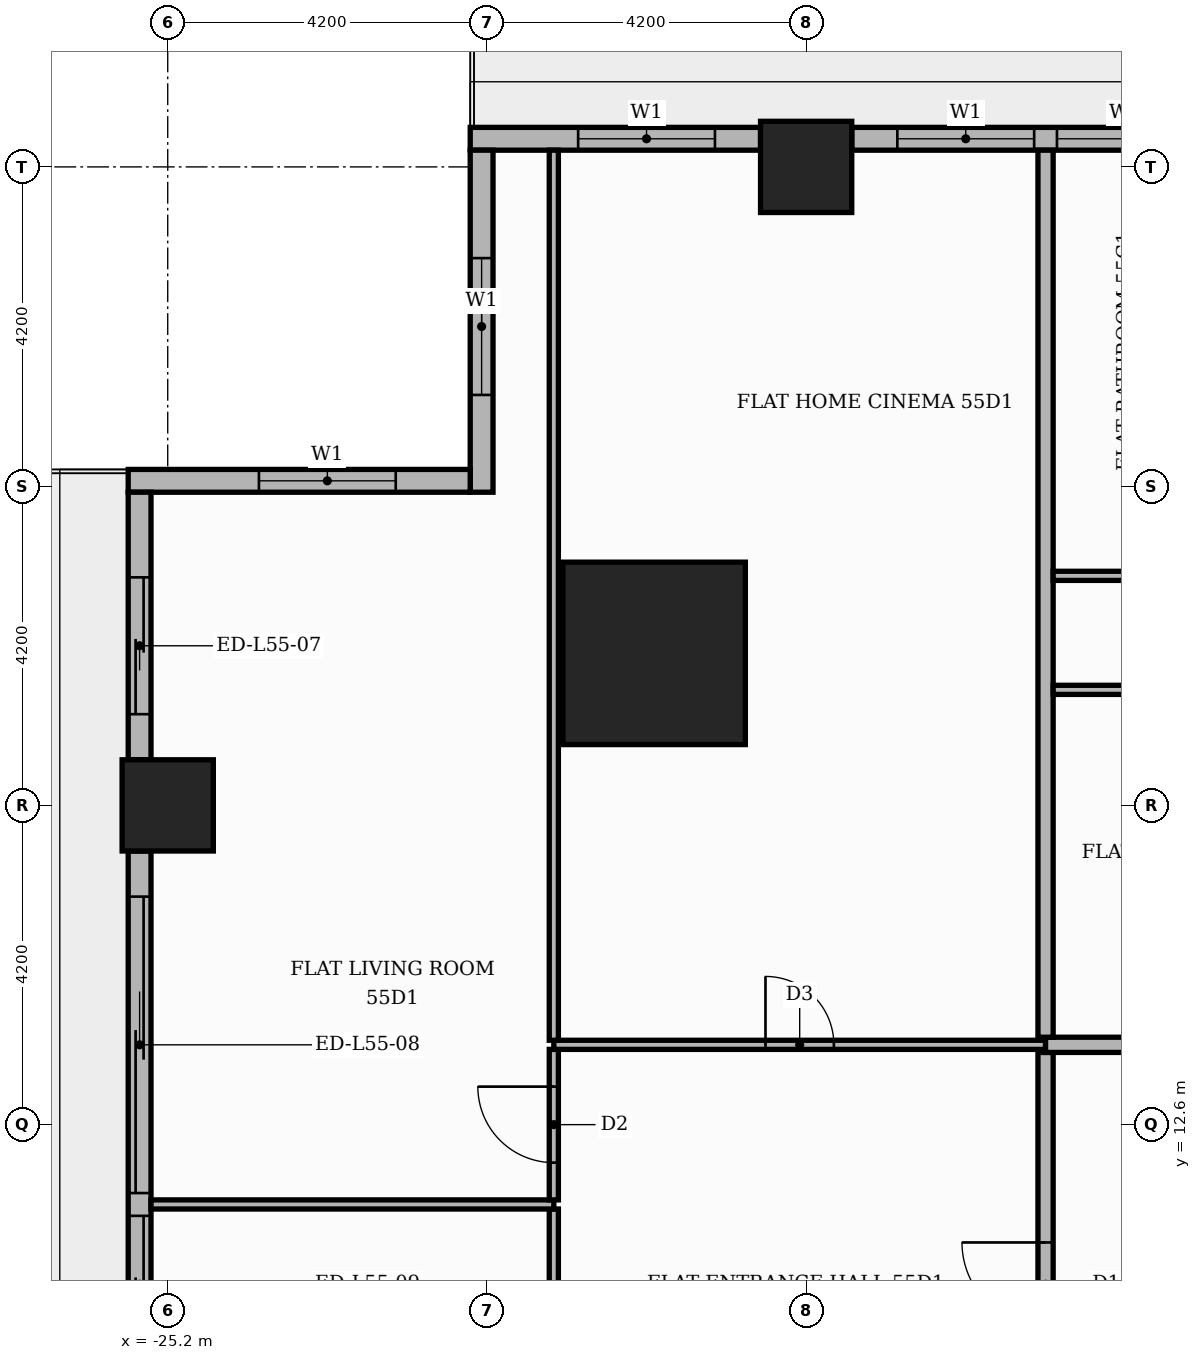
"""IFC4 building model, lengths in metres.
Left out: names, types, materials, properties, quantities, classifications, styles, units other than length and angle.
Written with IfcOpenShell. Run it as: python <this file> out.ifc"""

import sys

from ifc_helpers import new_model, si_unit, direction, frame, frame_2d, origin, origin_2d, place, context, subcontext, project, spatial, rectangle, extrude, element, fill, save


model = new_model("IFC4")
c1 = context("Model", 3, precision=1e-05, world=origin(), true_north=direction((0.0, 1.0)))
c2 = subcontext(c1, "Body", "Model", "MODEL_VIEW")
j1 = project(units=[si_unit("LENGTHUNIT", "METRE"), si_unit("PLANEANGLEUNIT", "RADIAN")], contexts=[c1])
p1 = place(None, origin())
s1 = spatial("IfcSite", under=j1, at=p1, CompositionType="ELEMENT")
p2 = place(p1, origin())
s2 = spatial("IfcBuilding", under=s1, at=p2, CompositionType="ELEMENT")
p3 = place(p2, frame((0.0, 0.0, 231.3)))
s3 = spatial("IfcBuildingStorey", under=s2, at=p3, CompositionType="ELEMENT", Elevation=231.3)
p4 = place(p3, frame((-18.8, 18.8, 0.0), z_axis=(0.0, 0.0, 1.0), x_axis=(1.0, 0.0, 0.0)))
e1 = element("IfcColumn", 1, at=p4, inside=s3, PredefinedType="COLUMN", context=c2, shape_type="SweptSolid", body=[
    extrude(rectangle(XDim=2.4, YDim=2.4, at=origin_2d()), origin(), (0.0, 0.0, 1.0), 3.9),
])
for number, where, z_axis, x_axis in (
    (2, (-16.8, 25.2, 0.0), (0.0, 0.0, 1.0), (1.0, 0.0, 0.0)),
    (3, (-25.2, 16.8, 0.0), (0.0, 0.0, 1.0), (1.0, 0.0, 0.0)),
):
    element("IfcColumn", number, at=place(p3, frame(where, z_axis=z_axis, x_axis=x_axis)), inside=s3, PredefinedType="COLUMN", context=c2, shape_type="SweptSolid", body=[
        extrude(rectangle(XDim=1.2, YDim=1.2, at=origin_2d()), origin(), (0.0, 0.0, 1.0), 3.9),
    ])
p5 = place(p3, frame((-9.0, 25.57, 0.0), z_axis=(0.0, 0.0, 1.0), x_axis=(-1.0, 0.0, 0.0)))
e4 = element("IfcWall", 4, at=p5, inside=s3, PredefinedType="STANDARD", context=c2, shape_type="SweptSolid", body=[
    extrude(rectangle(XDim=7.2, YDim=0.3, at=frame_2d((3.6, 0.0))), origin(), (0.0, 0.0, 1.0), 3.4),
])
p6 = place(p5, frame((0.6, 0.0, 0.9)))
e5 = element("IfcOpeningElement", 5, at=p6, cuts=e4, PredefinedType="OPENING", context=c2, shape_type="SweptSolid", body=[
    extrude(rectangle(XDim=1.8, YDim=2.1, at=frame_2d((0.9, 1.05))), frame((0.0, 0.16, 0.0), z_axis=(0.0, -1.0, 0.0), x_axis=(1.0, 0.0, 0.0)), (0.0, 0.0, 1.0), 0.32),
])
p7 = place(p5, frame((2.7, 0.0, 0.9)))
e6 = element("IfcOpeningElement", 6, at=p7, cuts=e4, PredefinedType="OPENING", context=c2, shape_type="SweptSolid", body=[
    extrude(rectangle(XDim=1.8, YDim=2.1, at=frame_2d((0.9, 1.05))), frame((0.0, 0.16, 0.0), z_axis=(0.0, -1.0, 0.0), x_axis=(1.0, 0.0, 0.0)), (0.0, 0.0, 1.0), 0.32),
])
p8 = place(p5, frame((4.8, 0.0, 0.9)))
e7 = element("IfcOpeningElement", 7, at=p8, cuts=e4, PredefinedType="OPENING", context=c2, shape_type="SweptSolid", body=[
    extrude(rectangle(XDim=1.8, YDim=2.1, at=frame_2d((0.9, 1.05))), frame((0.0, 0.16, 0.0), z_axis=(0.0, -1.0, 0.0), x_axis=(1.0, 0.0, 0.0)), (0.0, 0.0, 1.0), 0.32),
])
p9 = place(p3, frame((-17.4, 25.57, 0.0), z_axis=(0.0, 0.0, 1.0), x_axis=(-1.0, 0.0, 0.0)))
e8 = element("IfcWall", 8, at=p9, inside=s3, PredefinedType="STANDARD", context=c2, shape_type="SweptSolid", body=[
    extrude(rectangle(XDim=3.82, YDim=0.3, at=frame_2d((1.91, 0.0))), origin(), (0.0, 0.0, 1.0), 3.4),
])
p10 = place(p9, frame((0.6, 0.0, 0.9)))
e9 = element("IfcOpeningElement", 9, at=p10, cuts=e8, PredefinedType="OPENING", context=c2, shape_type="SweptSolid", body=[
    extrude(rectangle(XDim=1.8, YDim=2.1, at=frame_2d((0.9, 1.05))), frame((0.0, 0.16, 0.0), z_axis=(0.0, -1.0, 0.0), x_axis=(1.0, 0.0, 0.0)), (0.0, 0.0, 1.0), 0.32),
])
p11 = place(p3, frame((-21.07, 25.42, 0.0), z_axis=(0.0, 0.0, 1.0), x_axis=(0.0, -1.0, 0.0)))
e10 = element("IfcWall", 10, at=p11, inside=s3, PredefinedType="STANDARD", context=c2, shape_type="SweptSolid", body=[
    extrude(rectangle(XDim=4.5, YDim=0.3, at=frame_2d((2.25, 0.0))), origin(), (0.0, 0.0, 1.0), 3.4),
])
p12 = place(p11, frame((1.42, 0.0, 0.9)))
e11 = element("IfcOpeningElement", 11, at=p12, cuts=e10, PredefinedType="OPENING", context=c2, shape_type="SweptSolid", body=[
    extrude(rectangle(XDim=1.8, YDim=2.1, at=frame_2d((0.9, 1.05))), frame((0.0, 0.16, 0.0), z_axis=(0.0, -1.0, 0.0), x_axis=(1.0, 0.0, 0.0)), (0.0, 0.0, 1.0), 0.32),
])
p13 = place(p3, frame((-21.22, 21.07, 0.0), z_axis=(0.0, 0.0, 1.0), x_axis=(-1.0, 0.0, 0.0)))
e12 = element("IfcWall", 12, at=p13, inside=s3, PredefinedType="STANDARD", context=c2, shape_type="SweptSolid", body=[
    extrude(rectangle(XDim=4.5, YDim=0.3, at=frame_2d((2.25, 0.0))), origin(), (0.0, 0.0, 1.0), 3.4),
])
p14 = place(p13, frame((0.98, 0.0, 0.9)))
e13 = element("IfcOpeningElement", 13, at=p14, cuts=e12, PredefinedType="OPENING", context=c2, shape_type="SweptSolid", body=[
    extrude(rectangle(XDim=1.8, YDim=2.1, at=frame_2d((0.9, 1.05))), frame((0.0, 0.16, 0.0), z_axis=(0.0, -1.0, 0.0), x_axis=(1.0, 0.0, 0.0)), (0.0, 0.0, 1.0), 0.32),
])
p15 = place(p3, frame((-25.57, 20.92, 0.0), z_axis=(0.0, 0.0, 1.0), x_axis=(0.0, -1.0, 0.0)))
e14 = element("IfcWall", 14, at=p15, inside=s3, PredefinedType="STANDARD", context=c2, shape_type="SweptSolid", body=[
    extrude(rectangle(XDim=3.52, YDim=0.3, at=frame_2d((1.76, 0.0))), origin(), (0.0, 0.0, 1.0), 3.4),
])
p16 = place(p15, frame((1.12, 0.0, 0.0)))
e15 = element("IfcOpeningElement", 15, at=p16, cuts=e14, PredefinedType="OPENING", context=c2, shape_type="SweptSolid", body=[
    extrude(rectangle(XDim=1.8, YDim=2.4, at=frame_2d((0.9, 1.2))), frame((0.0, 0.16, 0.0), z_axis=(0.0, -1.0, 0.0), x_axis=(1.0, 0.0, 0.0)), (0.0, 0.0, 1.0), 0.32),
])
p17 = place(p3, frame((-25.57, 16.2, 0.0), z_axis=(0.0, 0.0, 1.0), x_axis=(0.0, -1.0, 0.0)))
e16 = element("IfcWall", 16, at=p17, inside=s3, PredefinedType="STANDARD", context=c2, shape_type="SweptSolid", body=[
    extrude(rectangle(XDim=7.2, YDim=0.3, at=frame_2d((3.6, 0.0))), origin(), (0.0, 0.0, 1.0), 3.4),
])
p18 = place(p17, frame((0.6, 0.0, 0.0)))
e17 = element("IfcOpeningElement", 17, at=p18, cuts=e16, PredefinedType="OPENING", context=c2, shape_type="SweptSolid", body=[
    extrude(rectangle(XDim=3.9, YDim=2.4, at=frame_2d((1.95, 1.2))), frame((0.0, 0.16, 0.0), z_axis=(0.0, -1.0, 0.0), x_axis=(1.0, 0.0, 0.0)), (0.0, 0.0, 1.0), 0.32),
])
p19 = place(p17, frame((4.8, 0.0, 0.0)))
e18 = element("IfcOpeningElement", 18, at=p19, cuts=e16, PredefinedType="OPENING", context=c2, shape_type="SweptSolid", body=[
    extrude(rectangle(XDim=1.8, YDim=2.4, at=frame_2d((0.9, 1.2))), frame((0.0, 0.16, 0.0), z_axis=(0.0, -1.0, 0.0), x_axis=(1.0, 0.0, 0.0)), (0.0, 0.0, 1.0), 0.32),
])
p20 = place(p3, frame((-13.65, -13.55, 0.0), z_axis=(0.0, 0.0, 1.0), x_axis=(0.0, 1.0, 0.0)))
e19 = element("IfcWall", 19, at=p20, inside=s3, PredefinedType="PARTITIONING", context=c2, shape_type="SweptSolid", body=[
    extrude(rectangle(XDim=27.1, YDim=0.2, at=frame_2d((13.55, 0.0))), origin(), (0.0, 0.0, 1.0), 3.4),
])
p21 = place(p20, frame((23.5, 0.0, 0.0)))
e20 = element("IfcOpeningElement", 20, at=p21, cuts=e19, PredefinedType="OPENING", context=c2, shape_type="SweptSolid", body=[
    extrude(rectangle(XDim=1.1, YDim=2.4, at=frame_2d((0.55, 1.2))), frame((0.0, 0.11, 0.0), z_axis=(0.0, -1.0, 0.0), x_axis=(1.0, 0.0, 0.0)), (0.0, 0.0, 1.0), 0.22),
])
p22 = place(p3, frame((-20.12, 3.21, 0.0), z_axis=(0.0, 0.0, 1.0), x_axis=(0.0, 1.0, 0.0)))
e21 = element("IfcWall", 21, at=p22, inside=s3, PredefinedType="PARTITIONING", context=c2, shape_type="SweptSolid", body=[
    extrude(rectangle(XDim=8.28, YDim=0.12, at=frame_2d((4.14, 0.0))), origin(), (0.0, 0.0, 1.0), 3.4),
])
p23 = place(p22, frame((3.69, 0.0, 0.0)))
e22 = element("IfcOpeningElement", 22, at=p23, cuts=e21, PredefinedType="OPENING", context=c2, shape_type="SweptSolid", body=[
    extrude(rectangle(XDim=0.9, YDim=2.1, at=frame_2d((0.45, 1.05))), frame((0.0, 0.07, 0.0), z_axis=(0.0, -1.0, 0.0), x_axis=(1.0, 0.0, 0.0)), (0.0, 0.0, 1.0), 0.14),
])
p24 = place(p3, frame((-25.42, 11.55, 0.0), z_axis=(0.0, 0.0, 1.0), x_axis=(1.0, 0.0, 0.0)))
e23 = element("IfcWall", 23, at=p24, inside=s3, PredefinedType="PARTITIONING", context=c2, shape_type="SweptSolid", body=[
    extrude(rectangle(XDim=5.3, YDim=0.12, at=frame_2d((2.65, 0.0))), origin(), (0.0, 0.0, 1.0), 3.4),
])
p25 = place(p3, frame((-20.12, 11.61, 0.0), z_axis=(0.0, 0.0, 1.0), x_axis=(0.0, 1.0, 0.0)))
e24 = element("IfcWall", 24, at=p25, inside=s3, PredefinedType="PARTITIONING", context=c2, shape_type="SweptSolid", body=[
    extrude(rectangle(XDim=1.98, YDim=0.12, at=frame_2d((0.99, 0.0))), origin(), (0.0, 0.0, 1.0), 3.4),
])
p26 = place(p25, frame((0.49, 0.0, 0.0)))
e25 = element("IfcOpeningElement", 25, at=p26, cuts=e24, PredefinedType="OPENING", context=c2, shape_type="SweptSolid", body=[
    extrude(rectangle(XDim=1.0, YDim=2.1, at=frame_2d((0.5, 1.05))), frame((0.0, 0.07, 0.0), z_axis=(0.0, -1.0, 0.0), x_axis=(1.0, 0.0, 0.0)), (0.0, 0.0, 1.0), 0.14),
])
p27 = place(p3, frame((-20.12, 13.65, 0.0), z_axis=(0.0, 0.0, 1.0), x_axis=(1.0, 0.0, 0.0)))
e26 = element("IfcWall", 26, at=p27, inside=s3, PredefinedType="PARTITIONING", context=c2, shape_type="SweptSolid", body=[
    extrude(rectangle(XDim=6.47, YDim=0.12, at=frame_2d((3.235, 0.0))), origin(), (0.0, 0.0, 1.0), 3.4),
])
p28 = place(p27, frame((2.785, 0.0, 0.0)))
e27 = element("IfcOpeningElement", 27, at=p28, cuts=e26, PredefinedType="OPENING", context=c2, shape_type="SweptSolid", body=[
    extrude(rectangle(XDim=0.9, YDim=2.1, at=frame_2d((0.45, 1.05))), frame((0.0, 0.07, 0.0), z_axis=(0.0, -1.0, 0.0), x_axis=(1.0, 0.0, 0.0)), (0.0, 0.0, 1.0), 0.14),
])
p29 = place(p3, frame((-13.65, 13.65, 0.0), z_axis=(0.0, 0.0, 1.0), x_axis=(1.0, 0.0, 0.0)))
e28 = element("IfcWall", 28, at=p29, inside=s3, PredefinedType="PARTITIONING", context=c2, shape_type="SweptSolid", body=[
    extrude(rectangle(XDim=34.07, YDim=0.2, at=frame_2d((17.035, 0.0))), origin(), (0.0, 0.0, 1.0), 3.4),
])
p30 = place(p29, frame((23.6, 0.0, 0.0)))
e29 = element("IfcOpeningElement", 29, at=p30, cuts=e28, PredefinedType="OPENING", context=c2, shape_type="SweptSolid", body=[
    extrude(rectangle(XDim=1.1, YDim=2.4, at=frame_2d((0.55, 1.2))), frame((0.0, 0.11, 0.0), z_axis=(0.0, -1.0, 0.0), x_axis=(1.0, 0.0, 0.0)), (0.0, 0.0, 1.0), 0.22),
])
p31 = place(p3, frame((-20.12, 13.71, 0.0), z_axis=(0.0, 0.0, 1.0), x_axis=(0.0, 1.0, 0.0)))
e30 = element("IfcWall", 30, at=p31, inside=s3, PredefinedType="PARTITIONING", context=c2, shape_type="SweptSolid", body=[
    extrude(rectangle(XDim=11.71, YDim=0.12, at=frame_2d((5.855, 0.0))), origin(), (0.0, 0.0, 1.0), 3.4),
])
p32 = place(p3, frame((-13.65, 13.75, 0.0), z_axis=(0.0, 0.0, 1.0), x_axis=(0.0, 1.0, 0.0)))
e31 = element("IfcWall", 31, at=p32, inside=s3, PredefinedType="PARTITIONING", context=c2, shape_type="SweptSolid", body=[
    extrude(rectangle(XDim=11.67, YDim=0.2, at=frame_2d((5.835, 0.0))), origin(), (0.0, 0.0, 1.0), 3.4),
])
p33 = place(p3, frame((-13.55, 18.32, 0.0), z_axis=(0.0, 0.0, 1.0), x_axis=(1.0, 0.0, 0.0)))
e32 = element("IfcWall", 32, at=p33, inside=s3, PredefinedType="PARTITIONING", context=c2, shape_type="SweptSolid", body=[
    extrude(rectangle(XDim=20.9, YDim=0.12, at=frame_2d((10.45, 0.0))), origin(), (0.0, 0.0, 1.0), 3.4),
])
p34 = place(p33, frame((17.525, 0.0, 0.0)))
e33 = element("IfcOpeningElement", 33, at=p34, cuts=e32, PredefinedType="OPENING", context=c2, shape_type="SweptSolid", body=[
    extrude(rectangle(XDim=0.9, YDim=2.1, at=frame_2d((0.45, 1.05))), frame((0.0, 0.07, 0.0), z_axis=(0.0, -1.0, 0.0), x_axis=(1.0, 0.0, 0.0)), (0.0, 0.0, 1.0), 0.14),
])
p35 = place(p33, frame((12.35, 0.0, 0.0)))
e34 = element("IfcOpeningElement", 34, at=p35, cuts=e32, PredefinedType="OPENING", context=c2, shape_type="SweptSolid", body=[
    extrude(rectangle(XDim=0.9, YDim=2.1, at=frame_2d((0.45, 1.05))), frame((0.0, 0.07, 0.0), z_axis=(0.0, -1.0, 0.0), x_axis=(1.0, 0.0, 0.0)), (0.0, 0.0, 1.0), 0.14),
])
p36 = place(p33, frame((9.05, 0.0, 0.0)))
e35 = element("IfcOpeningElement", 35, at=p36, cuts=e32, PredefinedType="OPENING", context=c2, shape_type="SweptSolid", body=[
    extrude(rectangle(XDim=0.9, YDim=2.1, at=frame_2d((0.45, 1.05))), frame((0.0, 0.07, 0.0), z_axis=(0.0, -1.0, 0.0), x_axis=(1.0, 0.0, 0.0)), (0.0, 0.0, 1.0), 0.14),
])
p37 = place(p33, frame((5.9, 0.0, 0.0)))
e36 = element("IfcOpeningElement", 36, at=p37, cuts=e32, PredefinedType="OPENING", context=c2, shape_type="SweptSolid", body=[
    extrude(rectangle(XDim=0.9, YDim=2.1, at=frame_2d((0.45, 1.05))), frame((0.0, 0.07, 0.0), z_axis=(0.0, -1.0, 0.0), x_axis=(1.0, 0.0, 0.0)), (0.0, 0.0, 1.0), 0.14),
])
p38 = place(p33, frame((1.625, 0.0, 0.0)))
e37 = element("IfcOpeningElement", 37, at=p38, cuts=e32, PredefinedType="OPENING", context=c2, shape_type="SweptSolid", body=[
    extrude(rectangle(XDim=0.9, YDim=2.1, at=frame_2d((0.45, 1.05))), frame((0.0, 0.07, 0.0), z_axis=(0.0, -1.0, 0.0), x_axis=(1.0, 0.0, 0.0)), (0.0, 0.0, 1.0), 0.14),
])
p39 = place(p3, frame((-13.55, 19.82, 0.0), z_axis=(0.0, 0.0, 1.0), x_axis=(1.0, 0.0, 0.0)))
e38 = element("IfcWall", 38, at=p39, inside=s3, PredefinedType="PARTITIONING", context=c2, shape_type="SweptSolid", body=[
    extrude(rectangle(XDim=31.15, YDim=0.12, at=frame_2d((15.575, 0.0))), origin(), (0.0, 0.0, 1.0), 3.4),
])
p40 = place(p39, frame((25.65, 0.0, 0.0)))
e39 = element("IfcOpeningElement", 39, at=p40, cuts=e38, PredefinedType="OPENING", context=c2, shape_type="SweptSolid", body=[
    extrude(rectangle(XDim=1.0, YDim=2.1, at=frame_2d((0.5, 1.05))), frame((0.0, 0.07, 0.0), z_axis=(0.0, -1.0, 0.0), x_axis=(1.0, 0.0, 0.0)), (0.0, 0.0, 1.0), 0.14),
])
p41 = place(p39, frame((22.55, 0.0, 0.0)))
e40 = element("IfcOpeningElement", 40, at=p41, cuts=e38, PredefinedType="OPENING", context=c2, shape_type="SweptSolid", body=[
    extrude(rectangle(XDim=0.9, YDim=2.1, at=frame_2d((0.45, 1.05))), frame((0.0, 0.07, 0.0), z_axis=(0.0, -1.0, 0.0), x_axis=(1.0, 0.0, 0.0)), (0.0, 0.0, 1.0), 0.14),
])
p42 = place(p39, frame((18.35, 0.0, 0.0)))
e41 = element("IfcOpeningElement", 41, at=p42, cuts=e38, PredefinedType="OPENING", context=c2, shape_type="SweptSolid", body=[
    extrude(rectangle(XDim=0.9, YDim=2.1, at=frame_2d((0.45, 1.05))), frame((0.0, 0.07, 0.0), z_axis=(0.0, -1.0, 0.0), x_axis=(1.0, 0.0, 0.0)), (0.0, 0.0, 1.0), 0.14),
])
p43 = place(p39, frame((9.95, 0.0, 0.0)))
e42 = element("IfcOpeningElement", 42, at=p43, cuts=e38, PredefinedType="OPENING", context=c2, shape_type="SweptSolid", body=[
    extrude(rectangle(XDim=0.9, YDim=2.1, at=frame_2d((0.45, 1.05))), frame((0.0, 0.07, 0.0), z_axis=(0.0, -1.0, 0.0), x_axis=(1.0, 0.0, 0.0)), (0.0, 0.0, 1.0), 0.14),
])
p44 = place(p39, frame((3.65, 0.0, 0.0)))
e43 = element("IfcOpeningElement", 43, at=p44, cuts=e38, PredefinedType="OPENING", context=c2, shape_type="SweptSolid", body=[
    extrude(rectangle(XDim=0.9, YDim=2.1, at=frame_2d((0.45, 1.05))), frame((0.0, 0.07, 0.0), z_axis=(0.0, -1.0, 0.0), x_axis=(1.0, 0.0, 0.0)), (0.0, 0.0, 1.0), 0.14),
])
p45 = place(p7, origin())
e44 = element("IfcWindow", 44, at=p45, inside=s3, PartitioningType="SINGLE_PANEL", PredefinedType="WINDOW", context=c2, shape_type="SweptSolid", body=[
    extrude(rectangle(XDim=1.8, YDim=2.1, at=frame_2d((0.9, 1.05))), frame((0.0, 0.03, 0.0), z_axis=(0.0, -1.0, 0.0), x_axis=(1.0, 0.0, 0.0)), (0.0, 0.0, 1.0), 0.06),
])
fill(e6, e44)
p46 = place(p8, origin())
e45 = element("IfcWindow", 45, at=p46, inside=s3, PartitioningType="SINGLE_PANEL", PredefinedType="WINDOW", context=c2, shape_type="SweptSolid", body=[
    extrude(rectangle(XDim=1.8, YDim=2.1, at=frame_2d((0.9, 1.05))), frame((0.0, 0.03, 0.0), z_axis=(0.0, -1.0, 0.0), x_axis=(1.0, 0.0, 0.0)), (0.0, 0.0, 1.0), 0.06),
])
fill(e7, e45)
p47 = place(p10, origin())
e46 = element("IfcWindow", 46, at=p47, inside=s3, PartitioningType="SINGLE_PANEL", PredefinedType="WINDOW", context=c2, shape_type="SweptSolid", body=[
    extrude(rectangle(XDim=1.8, YDim=2.1, at=frame_2d((0.9, 1.05))), frame((0.0, 0.03, 0.0), z_axis=(0.0, -1.0, 0.0), x_axis=(1.0, 0.0, 0.0)), (0.0, 0.0, 1.0), 0.06),
])
fill(e9, e46)
p48 = place(p12, origin())
e47 = element("IfcWindow", 47, at=p48, inside=s3, PartitioningType="SINGLE_PANEL", PredefinedType="WINDOW", context=c2, shape_type="SweptSolid", body=[
    extrude(rectangle(XDim=1.8, YDim=2.1, at=frame_2d((0.9, 1.05))), frame((0.0, 0.03, 0.0), z_axis=(0.0, -1.0, 0.0), x_axis=(1.0, 0.0, 0.0)), (0.0, 0.0, 1.0), 0.06),
])
fill(e11, e47)
p49 = place(p14, origin())
e48 = element("IfcWindow", 48, at=p49, inside=s3, PartitioningType="SINGLE_PANEL", PredefinedType="WINDOW", context=c2, shape_type="SweptSolid", body=[
    extrude(rectangle(XDim=1.8, YDim=2.1, at=frame_2d((0.9, 1.05))), frame((0.0, 0.03, 0.0), z_axis=(0.0, -1.0, 0.0), x_axis=(1.0, 0.0, 0.0)), (0.0, 0.0, 1.0), 0.06),
])
fill(e13, e48)
p50 = place(p16, origin())
e49 = element("IfcDoor", 49, at=p50, inside=s3, OperationType="SLIDING_TO_RIGHT", PredefinedType="DOOR", context=c2, shape_type="SweptSolid", body=[
    extrude(rectangle(XDim=1.8, YDim=2.4, at=frame_2d((0.9, 1.2))), frame((0.0, 0.025, 0.0), z_axis=(0.0, -1.0, 0.0), x_axis=(1.0, 0.0, 0.0)), (0.0, 0.0, 1.0), 0.05),
])
fill(e15, e49)
p51 = place(p18, origin())
e50 = element("IfcDoor", 50, at=p51, inside=s3, OperationType="SLIDING_TO_LEFT", PredefinedType="DOOR", context=c2, shape_type="SweptSolid", body=[
    extrude(rectangle(XDim=3.9, YDim=2.4, at=frame_2d((1.95, 1.2))), frame((0.0, 0.025, 0.0), z_axis=(0.0, -1.0, 0.0), x_axis=(1.0, 0.0, 0.0)), (0.0, 0.0, 1.0), 0.05),
])
fill(e17, e50)
p52 = place(p19, origin())
e51 = element("IfcDoor", 51, at=p52, inside=s3, OperationType="SLIDING_TO_RIGHT", PredefinedType="DOOR", context=c2, shape_type="SweptSolid", body=[
    extrude(rectangle(XDim=1.8, YDim=2.4, at=frame_2d((0.9, 1.2))), frame((0.0, 0.025, 0.0), z_axis=(0.0, -1.0, 0.0), x_axis=(1.0, 0.0, 0.0)), (0.0, 0.0, 1.0), 0.05),
])
fill(e18, e51)
p53 = place(p21, origin())
e52 = element("IfcDoor", 52, at=p53, inside=s3, OperationType="SINGLE_SWING_RIGHT", PredefinedType="DOOR", context=c2, shape_type="SweptSolid", body=[
    extrude(rectangle(XDim=1.1, YDim=2.4, at=frame_2d((0.55, 1.2))), frame((0.0, 0.025, 0.0), z_axis=(0.0, -1.0, 0.0), x_axis=(1.0, 0.0, 0.0)), (0.0, 0.0, 1.0), 0.05),
])
fill(e20, e52)
p54 = place(p28, origin())
e53 = element("IfcDoor", 53, at=p54, inside=s3, OperationType="SINGLE_SWING_LEFT", PredefinedType="DOOR", context=c2, shape_type="SweptSolid", body=[
    extrude(rectangle(XDim=0.9, YDim=2.1, at=frame_2d((0.45, 1.05))), frame((0.0, 0.025, 0.0), z_axis=(0.0, -1.0, 0.0), x_axis=(1.0, 0.0, 0.0)), (0.0, 0.0, 1.0), 0.05),
])
fill(e27, e53)
p55 = place(p26, origin())
e54 = element("IfcDoor", 54, at=p55, inside=s3, OperationType="SINGLE_SWING_RIGHT", PredefinedType="DOOR", context=c2, shape_type="SweptSolid", body=[
    extrude(rectangle(XDim=1.0, YDim=2.1, at=frame_2d((0.5, 1.05))), frame((0.0, 0.025, 0.0), z_axis=(0.0, -1.0, 0.0), x_axis=(1.0, 0.0, 0.0)), (0.0, 0.0, 1.0), 0.05),
])
fill(e25, e54)
save(model, sys.argv[1])
